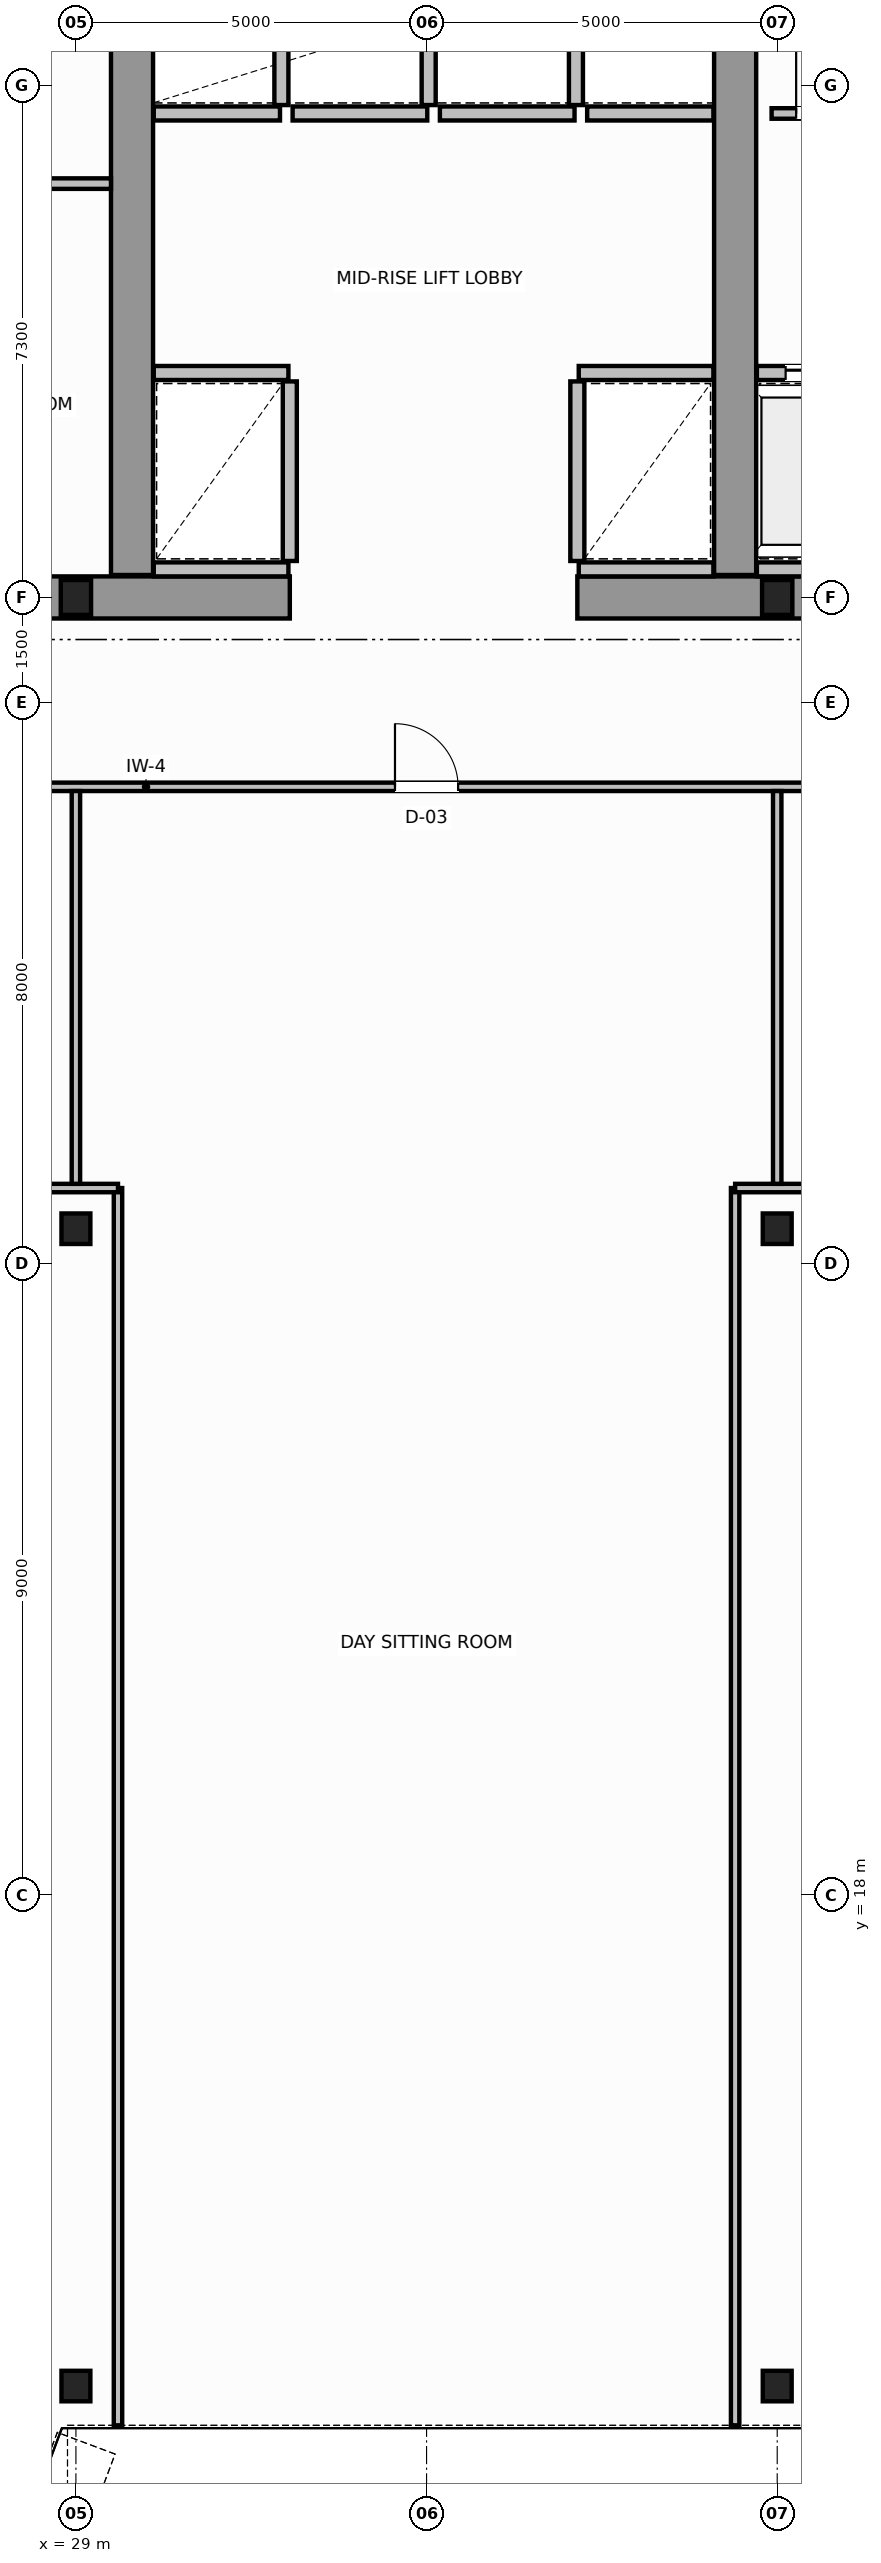
"""IFC4 building model, lengths in metres.
Left out: names, types, materials, properties, quantities, classifications, styles, units other than length and angle.
Written with IfcOpenShell. Run it as: python <this file> out.ifc"""

import sys

from ifc_helpers import new_model, si_unit, direction, frame, frame_2d, origin, origin_2d, place, context, subcontext, project, spatial, rectangle, i_section, extrude, source, transform, mapped, element, fill, save


model = new_model("IFC4")
c1 = context("Model", 3, precision=1e-05, world=origin(), true_north=direction((0.0, 1.0)))
c2 = subcontext(c1, "Body", "Model", "MODEL_VIEW")
j1 = project(units=[si_unit("LENGTHUNIT", "METRE"), si_unit("PLANEANGLEUNIT", "RADIAN")], contexts=[c1])
p1 = place(None, origin())
s1 = spatial("IfcSite", under=j1, at=p1, CompositionType="ELEMENT")
p2 = place(p1, origin())
s2 = spatial("IfcBuilding", under=s1, at=p2, CompositionType="ELEMENT")
p3 = place(p2, frame((0.0, 0.0, 203.2)))
s3 = spatial("IfcBuildingStorey", under=s2, at=p3, CompositionType="ELEMENT", Elevation=203.2)
m1 = source(origin(), c2, "Body", "SweptSolid", [
    extrude(i_section(OverallWidth=0.432, OverallDepth=0.498, WebThickness=0.055, FlangeThickness=0.068, FilletRadius=0.015, at=origin_2d()), origin(), (0.0, 0.0, 1.0), 3.8),
])
for number, where, z_axis, x_axis in (
    (1, (29.0, 36.5, 0.0), (0.0, 0.0, 1.0), (1.0, 0.0, 0.0)),
    (2, (39.0, 36.5, 0.0), (0.0, 0.0, 1.0), (1.0, 0.0, 0.0)),
):
    element("IfcColumn", number, at=place(p3, frame(where, z_axis=z_axis, x_axis=x_axis)), inside=s3, PredefinedType="COLUMN", context=c2, shape_type="MappedRepresentation", body=[
        mapped(m1, transform((0.0, 0.0, 0.0), scale=1.0)),
    ])
m2 = source(origin(), c2, "Body", "SweptSolid", [
    extrude(i_section(OverallWidth=0.412, OverallDepth=0.435, WebThickness=0.036, FlangeThickness=0.05, FilletRadius=0.015, at=origin_2d()), origin(), (0.0, 0.0, 1.0), 3.8),
])
for number, where, z_axis, x_axis in (
    (3, (29.0, 27.5, 0.0), (0.0, 0.0, 1.0), (1.0, 0.0, 0.0)),
    (4, (39.0, 27.5, 0.0), (0.0, 0.0, 1.0), (1.0, 0.0, 0.0)),
    (5, (29.0, 11.0, 0.0), (0.0, 0.0, 1.0), (1.0, 0.0, 0.0)),
    (6, (39.0, 11.0, 0.0), (0.0, 0.0, 1.0), (1.0, 0.0, 0.0)),
):
    element("IfcColumn", number, at=place(p3, frame(where, z_axis=z_axis, x_axis=x_axis)), inside=s3, PredefinedType="COLUMN", context=c2, shape_type="MappedRepresentation", body=[
        mapped(m2, transform((0.0, 0.0, 0.0), scale=1.0)),
    ])
for number, where, z_axis, x_axis in (
    (7, (27.55, 36.5, 0.0), (0.0, 0.0, 1.0), (1.0, 0.0, 0.0)),
    (8, (36.15, 36.5, 0.0), (0.0, 0.0, 1.0), (1.0, 0.0, 0.0)),
):
    element("IfcWall", number, at=place(p3, frame(where, z_axis=z_axis, x_axis=x_axis)), inside=s3, PredefinedType="SHEAR", context=c2, shape_type="SweptSolid", body=[
        extrude(rectangle(XDim=4.5, YDim=0.6, at=frame_2d((2.25, 0.0))), origin(), (0.0, 0.0, 1.0), 3.8),
    ])
for number, where, z_axis, x_axis in (
    (9, (29.8, 36.82, 0.0), (0.0, 0.0, 1.0), (0.0, 1.0, 0.0)),
    (10, (38.4, 36.82, 0.0), (0.0, 0.0, 1.0), (0.0, 1.0, 0.0)),
):
    element("IfcWall", number, at=place(p3, frame(where, z_axis=z_axis, x_axis=x_axis)), inside=s3, PredefinedType="SHEAR", context=c2, shape_type="SweptSolid", body=[
        extrude(rectangle(XDim=9.38, YDim=0.6, at=frame_2d((4.69, 0.0))), origin(), (0.0, 0.0, 1.0), 3.8),
    ])
p4 = place(p3, frame((30.11, 39.7, 0.0), z_axis=(0.0, 0.0, 1.0), x_axis=(1.0, 0.0, 0.0)))
e11 = element("IfcWall", 11, at=p4, inside=s3, PredefinedType="SOLIDWALL", context=c2, shape_type="SweptSolid", body=[
    extrude(rectangle(XDim=1.92, YDim=0.2, at=frame_2d((0.96, 0.0))), origin(), (0.0, 0.0, 1.0), 3.58),
])
p5 = place(p3, frame((30.11, 36.9, 0.0), z_axis=(0.0, 0.0, 1.0), x_axis=(1.0, 0.0, 0.0)))
e12 = element("IfcWall", 12, at=p5, inside=s3, PredefinedType="SOLIDWALL", context=c2, shape_type="SweptSolid", body=[
    extrude(rectangle(XDim=1.92, YDim=0.2, at=frame_2d((0.96, 0.0))), origin(), (0.0, 0.0, 1.0), 2.37),
])
p6 = place(p3, frame((32.05, 37.02, 0.0), z_axis=(0.0, 0.0, 1.0), x_axis=(0.0, 1.0, 0.0)))
e13 = element("IfcWall", 13, at=p6, inside=s3, PredefinedType="SOLIDWALL", context=c2, shape_type="SweptSolid", body=[
    extrude(rectangle(XDim=2.56, YDim=0.2, at=frame_2d((1.28, 0.0))), origin(), (0.0, 0.0, 1.0), 3.58),
])
p7 = place(p3, frame((36.17, 39.7, 0.0), z_axis=(0.0, 0.0, 1.0), x_axis=(1.0, 0.0, 0.0)))
e14 = element("IfcWall", 14, at=p7, inside=s3, PredefinedType="SOLIDWALL", context=c2, shape_type="SweptSolid", body=[
    extrude(rectangle(XDim=1.92, YDim=0.2, at=frame_2d((0.96, 0.0))), origin(), (0.0, 0.0, 1.0), 3.58),
])
p8 = place(p3, frame((36.17, 36.9, 0.0), z_axis=(0.0, 0.0, 1.0), x_axis=(1.0, 0.0, 0.0)))
e15 = element("IfcWall", 15, at=p8, inside=s3, PredefinedType="SOLIDWALL", context=c2, shape_type="SweptSolid", body=[
    extrude(rectangle(XDim=1.92, YDim=0.2, at=frame_2d((0.96, 0.0))), origin(), (0.0, 0.0, 1.0), 2.37),
])
p9 = place(p3, frame((36.15, 37.02, 0.0), z_axis=(0.0, 0.0, 1.0), x_axis=(0.0, 1.0, 0.0)))
e16 = element("IfcWall", 16, at=p9, inside=s3, PredefinedType="SOLIDWALL", context=c2, shape_type="SweptSolid", body=[
    extrude(rectangle(XDim=2.56, YDim=0.2, at=frame_2d((1.28, 0.0))), origin(), (0.0, 0.0, 1.0), 3.58),
])
p10 = place(p3, frame((30.11, 43.4, 0.0), z_axis=(0.0, 0.0, 1.0), x_axis=(1.0, 0.0, 0.0)))
e17 = element("IfcWall", 17, at=p10, inside=s3, PredefinedType="SOLIDWALL", context=c2, shape_type="SweptSolid", body=[
    extrude(rectangle(XDim=1.8, YDim=0.2, at=frame_2d((0.9, 0.0))), origin(), (0.0, 0.0, 1.0), 3.58),
])
p11 = place(p3, frame((31.93, 43.52, 0.0), z_axis=(0.0, 0.0, 1.0), x_axis=(0.0, 1.0, 0.0)))
e18 = element("IfcWall", 18, at=p11, inside=s3, PredefinedType="SOLIDWALL", context=c2, shape_type="SweptSolid", body=[
    extrude(rectangle(XDim=2.56, YDim=0.2, at=frame_2d((1.28, 0.0))), origin(), (0.0, 0.0, 1.0), 3.58),
])
p12 = place(p3, frame((32.09, 43.4, 0.0), z_axis=(0.0, 0.0, 1.0), x_axis=(1.0, 0.0, 0.0)))
e19 = element("IfcWall", 19, at=p12, inside=s3, PredefinedType="SOLIDWALL", context=c2, shape_type="SweptSolid", body=[
    extrude(rectangle(XDim=1.92, YDim=0.2, at=frame_2d((0.96, 0.0))), origin(), (0.0, 0.0, 1.0), 3.58),
])
p13 = place(p3, frame((34.03, 43.52, 0.0), z_axis=(0.0, 0.0, 1.0), x_axis=(0.0, 1.0, 0.0)))
e20 = element("IfcWall", 20, at=p13, inside=s3, PredefinedType="SOLIDWALL", context=c2, shape_type="SweptSolid", body=[
    extrude(rectangle(XDim=2.56, YDim=0.2, at=frame_2d((1.28, 0.0))), origin(), (0.0, 0.0, 1.0), 3.58),
])
p14 = place(p3, frame((34.19, 43.4, 0.0), z_axis=(0.0, 0.0, 1.0), x_axis=(1.0, 0.0, 0.0)))
e21 = element("IfcWall", 21, at=p14, inside=s3, PredefinedType="SOLIDWALL", context=c2, shape_type="SweptSolid", body=[
    extrude(rectangle(XDim=1.92, YDim=0.2, at=frame_2d((0.96, 0.0))), origin(), (0.0, 0.0, 1.0), 3.58),
])
p15 = place(p3, frame((36.13, 43.52, 0.0), z_axis=(0.0, 0.0, 1.0), x_axis=(0.0, 1.0, 0.0)))
e22 = element("IfcWall", 22, at=p15, inside=s3, PredefinedType="SOLIDWALL", context=c2, shape_type="SweptSolid", body=[
    extrude(rectangle(XDim=2.56, YDim=0.2, at=frame_2d((1.28, 0.0))), origin(), (0.0, 0.0, 1.0), 3.58),
])
p16 = place(p3, frame((36.29, 43.4, 0.0), z_axis=(0.0, 0.0, 1.0), x_axis=(1.0, 0.0, 0.0)))
e23 = element("IfcWall", 23, at=p16, inside=s3, PredefinedType="SOLIDWALL", context=c2, shape_type="SweptSolid", body=[
    extrude(rectangle(XDim=1.8, YDim=0.2, at=frame_2d((0.9, 0.0))), origin(), (0.0, 0.0, 1.0), 3.58),
])
p17 = place(p3, frame((38.71, 39.7, 0.0), z_axis=(0.0, 0.0, 1.0), x_axis=(1.0, 0.0, 0.0)))
e24 = element("IfcWall", 24, at=p17, inside=s3, PredefinedType="SOLIDWALL", context=c2, shape_type="SweptSolid", body=[
    extrude(rectangle(XDim=1.92, YDim=0.2, at=frame_2d((0.96, 0.0))), origin(), (0.0, 0.0, 1.0), 3.58),
])
p18 = place(p17, frame((0.41, 0.0, 0.0)))
e25 = element("IfcOpeningElement", 25, at=p18, cuts=e24, PredefinedType="OPENING", context=c2, shape_type="SweptSolid", body=[
    extrude(rectangle(XDim=1.1, YDim=2.15, at=frame_2d((0.55, 1.075))), frame((0.0, 0.11, 0.0), z_axis=(0.0, -1.0, 0.0), x_axis=(1.0, 0.0, 0.0)), (0.0, 0.0, 1.0), 0.22),
])
p19 = place(p3, frame((38.71, 36.9, 0.0), z_axis=(0.0, 0.0, 1.0), x_axis=(1.0, 0.0, 0.0)))
e26 = element("IfcWall", 26, at=p19, inside=s3, PredefinedType="SOLIDWALL", context=c2, shape_type="SweptSolid", body=[
    extrude(rectangle(XDim=1.92, YDim=0.2, at=frame_2d((0.96, 0.0))), origin(), (0.0, 0.0, 1.0), 2.37),
])
p20 = place(p3, frame((21.5, 42.4, 0.0), z_axis=(0.0, 0.0, 1.0), x_axis=(1.0, 0.0, 0.0)))
e27 = element("IfcWall", 27, at=p20, inside=s3, PredefinedType="PARTITIONING", context=c2, shape_type="SweptSolid", body=[
    extrude(rectangle(XDim=8.0, YDim=0.15, at=frame_2d((4.0, 0.0))), origin(), (0.0, 0.0, 1.0), 3.58),
])
p21 = place(p20, frame((3.4, 0.0, 0.0)))
e28 = element("IfcOpeningElement", 28, at=p21, cuts=e27, PredefinedType="OPENING", context=c2, shape_type="SweptSolid", body=[
    extrude(rectangle(XDim=0.9, YDim=2.1, at=frame_2d((0.45, 1.05))), frame((0.0, 0.085, 0.0), z_axis=(0.0, -1.0, 0.0), x_axis=(1.0, 0.0, 0.0)), (0.0, 0.0, 1.0), 0.17),
])
p22 = place(p3, frame((38.92, 43.4, 0.0), z_axis=(0.0, 0.0, 1.0), x_axis=(1.0, 0.0, 0.0)))
e29 = element("IfcWall", 29, at=p22, inside=s3, PredefinedType="PARTITIONING", context=c2, shape_type="SweptSolid", body=[
    extrude(rectangle(XDim=1.6, YDim=0.15, at=frame_2d((0.8, 0.0))), origin(), (0.0, 0.0, 1.0), 3.58),
])
p23 = place(p22, frame((0.35, 0.0, 0.0)))
e30 = element("IfcOpeningElement", 30, at=p23, cuts=e29, PredefinedType="OPENING", context=c2, shape_type="SweptSolid", body=[
    extrude(rectangle(XDim=0.9, YDim=2.1, at=frame_2d((0.45, 1.05))), frame((0.0, 0.085, 0.0), z_axis=(0.0, -1.0, 0.0), x_axis=(1.0, 0.0, 0.0)), (0.0, 0.0, 1.0), 0.17),
])
p24 = place(p3, frame((7.776, 33.8, 0.0), z_axis=(0.0, 0.0, 1.0), x_axis=(1.0, 0.0, 0.0)))
e31 = element("IfcWall", 31, at=p24, inside=s3, PredefinedType="PARTITIONING", context=c2, shape_type="SweptSolid", body=[
    extrude(rectangle(XDim=52.449, YDim=0.12, at=frame_2d((26.224, 0.0))), origin(), (0.0, 0.0, 1.0), 3.58),
])
p25 = place(p24, frame((4.082, 0.0, 0.0)))
e32 = element("IfcOpeningElement", 32, at=p25, cuts=e31, PredefinedType="OPENING", context=c2, shape_type="SweptSolid", body=[
    extrude(rectangle(XDim=0.9, YDim=2.15, at=frame_2d((0.45, 1.075))), frame((0.0, 0.07, 0.0), z_axis=(0.0, -1.0, 0.0), x_axis=(1.0, 0.0, 0.0)), (0.0, 0.0, 1.0), 0.14),
])
p26 = place(p24, frame((11.274, 0.0, 0.0)))
e33 = element("IfcOpeningElement", 33, at=p26, cuts=e31, PredefinedType="OPENING", context=c2, shape_type="SweptSolid", body=[
    extrude(rectangle(XDim=0.9, YDim=2.15, at=frame_2d((0.45, 1.075))), frame((0.0, 0.07, 0.0), z_axis=(0.0, -1.0, 0.0), x_axis=(1.0, 0.0, 0.0)), (0.0, 0.0, 1.0), 0.14),
])
p27 = place(p24, frame((17.774, 0.0, 0.0)))
e34 = element("IfcOpeningElement", 34, at=p27, cuts=e31, PredefinedType="OPENING", context=c2, shape_type="SweptSolid", body=[
    extrude(rectangle(XDim=0.9, YDim=2.15, at=frame_2d((0.45, 1.075))), frame((0.0, 0.07, 0.0), z_axis=(0.0, -1.0, 0.0), x_axis=(1.0, 0.0, 0.0)), (0.0, 0.0, 1.0), 0.14),
])
p28 = place(p24, frame((25.774, 0.0, 0.0)))
e35 = element("IfcOpeningElement", 35, at=p28, cuts=e31, PredefinedType="OPENING", context=c2, shape_type="SweptSolid", body=[
    extrude(rectangle(XDim=0.9, YDim=2.15, at=frame_2d((0.45, 1.075))), frame((0.0, 0.07, 0.0), z_axis=(0.0, -1.0, 0.0), x_axis=(1.0, 0.0, 0.0)), (0.0, 0.0, 1.0), 0.14),
])
p29 = place(p24, frame((33.774, 0.0, 0.0)))
e36 = element("IfcOpeningElement", 36, at=p29, cuts=e31, PredefinedType="OPENING", context=c2, shape_type="SweptSolid", body=[
    extrude(rectangle(XDim=0.9, YDim=2.15, at=frame_2d((0.45, 1.075))), frame((0.0, 0.07, 0.0), z_axis=(0.0, -1.0, 0.0), x_axis=(1.0, 0.0, 0.0)), (0.0, 0.0, 1.0), 0.14),
])
p30 = place(p24, frame((40.174, 0.0, 0.0)))
e37 = element("IfcOpeningElement", 37, at=p30, cuts=e31, PredefinedType="OPENING", context=c2, shape_type="SweptSolid", body=[
    extrude(rectangle(XDim=0.9, YDim=2.15, at=frame_2d((0.45, 1.075))), frame((0.0, 0.07, 0.0), z_axis=(0.0, -1.0, 0.0), x_axis=(1.0, 0.0, 0.0)), (0.0, 0.0, 1.0), 0.14),
])
p31 = place(p24, frame((47.366, 0.0, 0.0)))
e38 = element("IfcOpeningElement", 38, at=p31, cuts=e31, PredefinedType="OPENING", context=c2, shape_type="SweptSolid", body=[
    extrude(rectangle(XDim=0.9, YDim=2.15, at=frame_2d((0.45, 1.075))), frame((0.0, 0.07, 0.0), z_axis=(0.0, -1.0, 0.0), x_axis=(1.0, 0.0, 0.0)), (0.0, 0.0, 1.0), 0.14),
])
p32 = place(p3, frame((29.6, 10.44, 0.0), z_axis=(0.0, 0.0, 1.0), x_axis=(0.0, 1.0, 0.0)))
e39 = element("IfcWall", 39, at=p32, inside=s3, PredefinedType="PARTITIONING", context=c2, shape_type="SweptSolid", body=[
    extrude(rectangle(XDim=17.64, YDim=0.12, at=frame_2d((8.82, 0.0))), origin(), (0.0, 0.0, 1.0), 3.58),
])
p33 = place(p3, frame((28.4, 28.08, 0.0), z_axis=(0.0, 0.0, 1.0), x_axis=(1.0, 0.0, 0.0)))
e40 = element("IfcWall", 40, at=p33, inside=s3, PredefinedType="PARTITIONING", context=c2, shape_type="SweptSolid", body=[
    extrude(rectangle(XDim=1.2, YDim=0.12, at=frame_2d((0.6, 0.0))), origin(), (0.0, 0.0, 1.0), 3.58),
])
p34 = place(p3, frame((29.0, 28.14, 0.0), z_axis=(0.0, 0.0, 1.0), x_axis=(0.0, 1.0, 0.0)))
e41 = element("IfcWall", 41, at=p34, inside=s3, PredefinedType="PARTITIONING", context=c2, shape_type="SweptSolid", body=[
    extrude(rectangle(XDim=5.6, YDim=0.12, at=frame_2d((2.8, 0.0))), origin(), (0.0, 0.0, 1.0), 2.37),
])
p35 = place(p3, frame((38.4, 10.44, 0.0), z_axis=(0.0, 0.0, 1.0), x_axis=(0.0, 1.0, 0.0)))
e42 = element("IfcWall", 42, at=p35, inside=s3, PredefinedType="PARTITIONING", context=c2, shape_type="SweptSolid", body=[
    extrude(rectangle(XDim=17.64, YDim=0.12, at=frame_2d((8.82, 0.0))), origin(), (0.0, 0.0, 1.0), 3.58),
])
p36 = place(p3, frame((38.4, 28.08, 0.0), z_axis=(0.0, 0.0, 1.0), x_axis=(1.0, 0.0, 0.0)))
e43 = element("IfcWall", 43, at=p36, inside=s3, PredefinedType="PARTITIONING", context=c2, shape_type="SweptSolid", body=[
    extrude(rectangle(XDim=1.2, YDim=0.12, at=frame_2d((0.6, 0.0))), origin(), (0.0, 0.0, 1.0), 3.58),
])
p37 = place(p3, frame((39.0, 28.14, 0.0), z_axis=(0.0, 0.0, 1.0), x_axis=(0.0, 1.0, 0.0)))
e44 = element("IfcWall", 44, at=p37, inside=s3, PredefinedType="PARTITIONING", context=c2, shape_type="SweptSolid", body=[
    extrude(rectangle(XDim=5.6, YDim=0.12, at=frame_2d((2.8, 0.0))), origin(), (0.0, 0.0, 1.0), 2.37),
])
m3 = source(origin(), c2, "Body", "SweptSolid", [
    extrude(rectangle(XDim=1.1, YDim=2.15, at=frame_2d((0.55, 1.075))), frame((0.0, 0.025, 0.0), z_axis=(0.0, -1.0, 0.0), x_axis=(1.0, 0.0, 0.0)), (0.0, 0.0, 1.0), 0.05),
])
p38 = place(p18, origin())
e45 = element("IfcDoor", 45, at=p38, inside=s3, OperationType="DOUBLE_DOOR_SLIDING", PredefinedType="DOOR", context=c2, shape_type="MappedRepresentation", body=[
    mapped(m3, transform((0.0, 0.0, 0.0), scale=1.0)),
])
fill(e25, e45)
m4 = source(origin(), c2, "Body", "SweptSolid", [
    extrude(rectangle(XDim=0.9, YDim=2.1, at=frame_2d((0.45, 1.05))), frame((0.0, 0.025, 0.0), z_axis=(0.0, -1.0, 0.0), x_axis=(1.0, 0.0, 0.0)), (0.0, 0.0, 1.0), 0.05),
])
p39 = place(p23, origin())
e46 = element("IfcDoor", 46, at=p39, inside=s3, OperationType="SINGLE_SWING_LEFT", PredefinedType="DOOR", context=c2, shape_type="MappedRepresentation", body=[
    mapped(m4, transform((0.0, 0.0, 0.0), scale=1.0)),
])
fill(e30, e46)
m5 = source(origin(), c2, "Body", "SweptSolid", [
    extrude(rectangle(XDim=0.9, YDim=2.15, at=frame_2d((0.45, 1.075))), frame((0.0, 0.025, 0.0), z_axis=(0.0, -1.0, 0.0), x_axis=(1.0, 0.0, 0.0)), (0.0, 0.0, 1.0), 0.05),
])
p40 = place(p28, origin())
e47 = element("IfcDoor", 47, at=p40, inside=s3, OperationType="SINGLE_SWING_RIGHT", PredefinedType="DOOR", context=c2, shape_type="MappedRepresentation", body=[
    mapped(m5, transform((0.0, 0.0, 0.0), scale=1.0)),
])
fill(e35, e47)
save(model, sys.argv[1])
